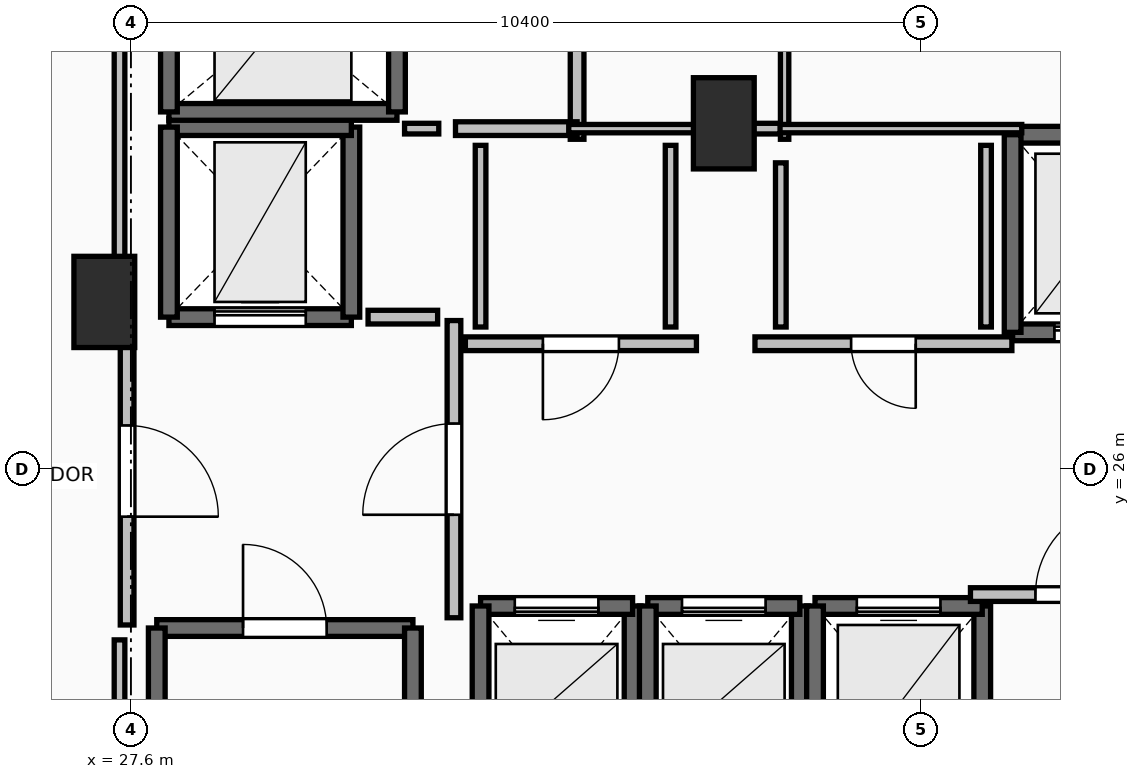
"""IFC4 building model, lengths in metres.
Left out: names, types, materials, properties, quantities, classifications, styles, units other than length and angle.
Written with IfcOpenShell. Run it as: python <this file> out.ifc"""

import sys

from ifc_helpers import new_model, si_unit, direction, frame, frame_2d, origin, origin_2d, place, context, subcontext, project, spatial, rectangle, extrude, element, fill, save


model = new_model("IFC4")
c1 = context("Model", 3, precision=1e-05, world=origin(), true_north=direction((0.0, 1.0)))
c2 = subcontext(c1, "Body", "Model", "MODEL_VIEW")
j1 = project(units=[si_unit("LENGTHUNIT", "METRE"), si_unit("PLANEANGLEUNIT", "RADIAN")], contexts=[c1])
p1 = place(None, origin())
s1 = spatial("IfcSite", under=j1, at=p1, CompositionType="ELEMENT")
p2 = place(p1, origin())
s2 = spatial("IfcBuilding", under=s1, at=p2, CompositionType="ELEMENT")
p3 = place(p2, frame((0.0, 0.0, 174.6)))
s3 = spatial("IfcBuildingStorey", under=s2, at=p3, CompositionType="ELEMENT", Elevation=174.6)
for number, where, z_axis, x_axis in (
    (1, (27.25, 28.2, 0.0), (0.0, 0.0, 1.0), (1.0, 0.0, 0.0)),
    (2, (35.4, 30.55, 0.0), (0.0, 0.0, 1.0), (1.0, 0.0, 0.0)),
):
    element("IfcColumn", number, at=place(p3, frame(where, z_axis=z_axis, x_axis=x_axis)), inside=s3, PredefinedType="PILASTER", context=c2, shape_type="SweptSolid", body=[
        extrude(rectangle(XDim=0.8, YDim=1.2, at=origin_2d()), origin(), (0.0, 0.0, 1.0), 4.5),
    ])
p4 = place(p3, frame((27.94, 23.91, 0.0), z_axis=(0.0, 0.0, 1.0), x_axis=(1.0, 0.0, 0.0)))
e3 = element("IfcWall", 3, at=p4, inside=s3, PredefinedType="SOLIDWALL", context=c2, shape_type="SweptSolid", body=[
    extrude(rectangle(XDim=3.37, YDim=0.22, at=frame_2d((1.685, 0.0))), origin(), (0.0, 0.0, 1.0), 4.24),
])
p5 = place(p4, frame((1.135, 0.0, 0.0)))
e4 = element("IfcOpeningElement", 4, at=p5, cuts=e3, PredefinedType="OPENING", context=c2, shape_type="SweptSolid", body=[
    extrude(rectangle(XDim=1.1, YDim=2.15, at=frame_2d((0.55, 1.075))), frame((0.0, 0.125, 0.0), z_axis=(0.0, -1.0, 0.0), x_axis=(1.0, 0.0, 0.0)), (0.0, 0.0, 1.0), 0.25),
])
for number, where, z_axis, x_axis in (
    (5, (31.31, 23.91, 0.0), (0.0, 0.0, 1.0), (0.0, -1.0, 0.0)),
    (6, (27.94, 16.49, 0.0), (0.0, 0.0, 1.0), (0.0, 1.0, 0.0)),
):
    element("IfcWall", number, at=place(p3, frame(where, z_axis=z_axis, x_axis=x_axis)), inside=s3, PredefinedType="SOLIDWALL", context=c2, shape_type="SweptSolid", body=[
        extrude(rectangle(XDim=7.42, YDim=0.22, at=frame_2d((3.71, 0.0))), origin(), (0.0, 0.0, 1.0), 4.24),
    ])
p6 = place(p3, frame((34.2, 21.8, 0.0), z_axis=(0.0, 0.0, 1.0), x_axis=(0.0, 1.0, 0.0)))
e7 = element("IfcWall", 7, at=p6, inside=s3, PredefinedType="SOLIDWALL", context=c2, shape_type="SweptSolid", body=[
    extrude(rectangle(XDim=2.4, YDim=0.22, at=frame_2d((1.2, 0.0))), origin(), (0.0, 0.0, 1.0), 4.24),
])
p7 = place(p3, frame((34.2, 24.2, 0.0), z_axis=(0.0, 0.0, 1.0), x_axis=(-1.0, 0.0, 0.0)))
e8 = element("IfcWall", 8, at=p7, inside=s3, PredefinedType="SOLIDWALL", context=c2, shape_type="SweptSolid", body=[
    extrude(rectangle(XDim=2.0, YDim=0.22, at=frame_2d((1.0, 0.0))), origin(), (0.0, 0.0, 1.0), 4.24),
])
p8 = place(p7, frame((0.45, 0.0, 0.0)))
e9 = element("IfcOpeningElement", 9, at=p8, cuts=e8, PredefinedType="OPENING", context=c2, shape_type="SweptSolid", body=[
    extrude(rectangle(XDim=1.1, YDim=2.2, at=frame_2d((0.55, 1.1))), frame((0.0, 0.125, 0.0), z_axis=(0.0, -1.0, 0.0), x_axis=(1.0, 0.0, 0.0)), (0.0, 0.0, 1.0), 0.25),
])
for number, where, z_axis, x_axis in (
    (10, (32.2, 24.2, 0.0), (0.0, 0.0, 1.0), (0.0, -1.0, 0.0)),
    (11, (36.4, 21.8, 0.0), (0.0, 0.0, 1.0), (0.0, 1.0, 0.0)),
):
    element("IfcWall", number, at=place(p3, frame(where, z_axis=z_axis, x_axis=x_axis)), inside=s3, PredefinedType="SOLIDWALL", context=c2, shape_type="SweptSolid", body=[
        extrude(rectangle(XDim=2.4, YDim=0.22, at=frame_2d((1.2, 0.0))), origin(), (0.0, 0.0, 1.0), 4.24),
    ])
p9 = place(p3, frame((36.4, 24.2, 0.0), z_axis=(0.0, 0.0, 1.0), x_axis=(-1.0, 0.0, 0.0)))
e12 = element("IfcWall", 12, at=p9, inside=s3, PredefinedType="SOLIDWALL", context=c2, shape_type="SweptSolid", body=[
    extrude(rectangle(XDim=2.0, YDim=0.22, at=frame_2d((1.0, 0.0))), origin(), (0.0, 0.0, 1.0), 4.24),
])
p10 = place(p9, frame((0.45, 0.0, 0.0)))
e13 = element("IfcOpeningElement", 13, at=p10, cuts=e12, PredefinedType="OPENING", context=c2, shape_type="SweptSolid", body=[
    extrude(rectangle(XDim=1.1, YDim=2.2, at=frame_2d((0.55, 1.1))), frame((0.0, 0.125, 0.0), z_axis=(0.0, -1.0, 0.0), x_axis=(1.0, 0.0, 0.0)), (0.0, 0.0, 1.0), 0.25),
])
p11 = place(p3, frame((34.4, 24.2, 0.0), z_axis=(0.0, 0.0, 1.0), x_axis=(0.0, -1.0, 0.0)))
e14 = element("IfcWall", 14, at=p11, inside=s3, PredefinedType="SOLIDWALL", context=c2, shape_type="SweptSolid", body=[
    extrude(rectangle(XDim=2.4, YDim=0.22, at=frame_2d((1.2, 0.0))), origin(), (0.0, 0.0, 1.0), 4.24),
])
p12 = place(p3, frame((38.8, 21.6, 0.0), z_axis=(0.0, 0.0, 1.0), x_axis=(0.0, 1.0, 0.0)))
e15 = element("IfcWall", 15, at=p12, inside=s3, PredefinedType="SOLIDWALL", context=c2, shape_type="SweptSolid", body=[
    extrude(rectangle(XDim=2.6, YDim=0.22, at=frame_2d((1.3, 0.0))), origin(), (0.0, 0.0, 1.0), 4.24),
])
p13 = place(p3, frame((38.8, 24.2, 0.0), z_axis=(0.0, 0.0, 1.0), x_axis=(-1.0, 0.0, 0.0)))
e16 = element("IfcWall", 16, at=p13, inside=s3, PredefinedType="SOLIDWALL", context=c2, shape_type="SweptSolid", body=[
    extrude(rectangle(XDim=2.2, YDim=0.22, at=frame_2d((1.1, 0.0))), origin(), (0.0, 0.0, 1.0), 4.24),
])
p14 = place(p13, frame((0.55, 0.0, 0.0)))
e17 = element("IfcOpeningElement", 17, at=p14, cuts=e16, PredefinedType="OPENING", context=c2, shape_type="SweptSolid", body=[
    extrude(rectangle(XDim=1.1, YDim=2.2, at=frame_2d((0.55, 1.1))), frame((0.0, 0.125, 0.0), z_axis=(0.0, -1.0, 0.0), x_axis=(1.0, 0.0, 0.0)), (0.0, 0.0, 1.0), 0.25),
])
p15 = place(p3, frame((36.6, 24.2, 0.0), z_axis=(0.0, 0.0, 1.0), x_axis=(0.0, -1.0, 0.0)))
e18 = element("IfcWall", 18, at=p15, inside=s3, PredefinedType="SOLIDWALL", context=c2, shape_type="SweptSolid", body=[
    extrude(rectangle(XDim=2.6, YDim=0.22, at=frame_2d((1.3, 0.0))), origin(), (0.0, 0.0, 1.0), 4.24),
])
p16 = place(p3, frame((39.2, 27.8, 0.0), z_axis=(0.0, 0.0, 1.0), x_axis=(1.0, 0.0, 0.0)))
e19 = element("IfcWall", 19, at=p16, inside=s3, PredefinedType="SOLIDWALL", context=c2, shape_type="SweptSolid", body=[
    extrude(rectangle(XDim=2.2, YDim=0.22, at=frame_2d((1.1, 0.0))), origin(), (0.0, 0.0, 1.0), 4.24),
])
p17 = place(p16, frame((0.55, 0.0, 0.0)))
e20 = element("IfcOpeningElement", 20, at=p17, cuts=e19, PredefinedType="OPENING", context=c2, shape_type="SweptSolid", body=[
    extrude(rectangle(XDim=1.1, YDim=2.2, at=frame_2d((0.55, 1.1))), frame((0.0, 0.125, 0.0), z_axis=(0.0, -1.0, 0.0), x_axis=(1.0, 0.0, 0.0)), (0.0, 0.0, 1.0), 0.25),
])
p18 = place(p3, frame((41.4, 30.4, 0.0), z_axis=(0.0, 0.0, 1.0), x_axis=(-1.0, 0.0, 0.0)))
e21 = element("IfcWall", 21, at=p18, inside=s3, PredefinedType="SOLIDWALL", context=c2, shape_type="SweptSolid", body=[
    extrude(rectangle(XDim=2.2, YDim=0.22, at=frame_2d((1.1, 0.0))), origin(), (0.0, 0.0, 1.0), 4.24),
])
p19 = place(p3, frame((39.2, 30.4, 0.0), z_axis=(0.0, 0.0, 1.0), x_axis=(0.0, -1.0, 0.0)))
e22 = element("IfcWall", 22, at=p19, inside=s3, PredefinedType="SOLIDWALL", context=c2, shape_type="SweptSolid", body=[
    extrude(rectangle(XDim=2.6, YDim=0.22, at=frame_2d((1.3, 0.0))), origin(), (0.0, 0.0, 1.0), 4.24),
])
p20 = place(p3, frame((28.1, 28.0, 0.0), z_axis=(0.0, 0.0, 1.0), x_axis=(1.0, 0.0, 0.0)))
e23 = element("IfcWall", 23, at=p20, inside=s3, PredefinedType="SHEAR", context=c2, shape_type="SweptSolid", body=[
    extrude(rectangle(XDim=2.4, YDim=0.22, at=frame_2d((1.2, 0.0))), origin(), (0.0, 0.0, 1.0), 4.24),
])
p21 = place(p20, frame((0.6, 0.0, 0.0)))
e24 = element("IfcOpeningElement", 24, at=p21, cuts=e23, PredefinedType="OPENING", context=c2, shape_type="SweptSolid", body=[
    extrude(rectangle(XDim=1.2, YDim=2.2, at=frame_2d((0.6, 1.1))), frame((0.0, 0.125, 0.0), z_axis=(0.0, -1.0, 0.0), x_axis=(1.0, 0.0, 0.0)), (0.0, 0.0, 1.0), 0.25),
])
p22 = place(p3, frame((30.5, 28.0, 0.0), z_axis=(0.0, 0.0, 1.0), x_axis=(0.0, 1.0, 0.0)))
e25 = element("IfcWall", 25, at=p22, inside=s3, PredefinedType="SHEAR", context=c2, shape_type="SweptSolid", body=[
    extrude(rectangle(XDim=2.5, YDim=0.22, at=frame_2d((1.25, 0.0))), origin(), (0.0, 0.0, 1.0), 4.24),
])
p23 = place(p3, frame((30.5, 30.5, 0.0), z_axis=(0.0, 0.0, 1.0), x_axis=(-1.0, 0.0, 0.0)))
e26 = element("IfcWall", 26, at=p23, inside=s3, PredefinedType="SHEAR", context=c2, shape_type="SweptSolid", body=[
    extrude(rectangle(XDim=2.4, YDim=0.22, at=frame_2d((1.2, 0.0))), origin(), (0.0, 0.0, 1.0), 4.24),
])
p24 = place(p3, frame((28.1, 30.5, 0.0), z_axis=(0.0, 0.0, 1.0), x_axis=(0.0, -1.0, 0.0)))
e27 = element("IfcWall", 27, at=p24, inside=s3, PredefinedType="SHEAR", context=c2, shape_type="SweptSolid", body=[
    extrude(rectangle(XDim=2.5, YDim=0.22, at=frame_2d((1.25, 0.0))), origin(), (0.0, 0.0, 1.0), 4.24),
])
p25 = place(p3, frame((28.1, 30.7, 0.0), z_axis=(0.0, 0.0, 1.0), x_axis=(1.0, 0.0, 0.0)))
e28 = element("IfcWall", 28, at=p25, inside=s3, PredefinedType="SOLIDWALL", context=c2, shape_type="SweptSolid", body=[
    extrude(rectangle(XDim=3.0, YDim=0.22, at=frame_2d((1.5, 0.0))), origin(), (0.0, 0.0, 1.0), 4.24),
])
for number, where, z_axis, x_axis in (
    (29, (31.1, 30.7, 0.0), (0.0, 0.0, 1.0), (0.0, 1.0, 0.0)),
    (30, (28.1, 33.2, 0.0), (0.0, 0.0, 1.0), (0.0, -1.0, 0.0)),
):
    element("IfcWall", number, at=place(p3, frame(where, z_axis=z_axis, x_axis=x_axis)), inside=s3, PredefinedType="SOLIDWALL", context=c2, shape_type="SweptSolid", body=[
        extrude(rectangle(XDim=2.5, YDim=0.22, at=frame_2d((1.25, 0.0))), origin(), (0.0, 0.0, 1.0), 4.24),
    ])
p26 = place(p3, frame((31.85, 24.045, 0.0), z_axis=(0.0, 0.0, 1.0), x_axis=(0.0, 1.0, 0.0)))
e31 = element("IfcWall", 31, at=p26, inside=s3, PredefinedType="PARTITIONING", context=c2, shape_type="SweptSolid", body=[
    extrude(rectangle(XDim=3.91, YDim=0.18, at=frame_2d((1.955, 0.0))), origin(), (0.0, 0.0, 1.0), 4.24),
])
p27 = place(p26, frame((1.355, 0.0, 0.0)))
e32 = element("IfcOpeningElement", 32, at=p27, cuts=e31, PredefinedType="OPENING", context=c2, shape_type="SweptSolid", body=[
    extrude(rectangle(XDim=1.2, YDim=2.15, at=frame_2d((0.6, 1.075))), frame((0.0, 0.105, 0.0), z_axis=(0.0, -1.0, 0.0), x_axis=(1.0, 0.0, 0.0)), (0.0, 0.0, 1.0), 0.21),
])
p28 = place(p3, frame((27.55, 28.0, 0.0), z_axis=(0.0, 0.0, 1.0), x_axis=(0.0, -1.0, 0.0)))
e33 = element("IfcWall", 33, at=p28, inside=s3, PredefinedType="PARTITIONING", context=c2, shape_type="SweptSolid", body=[
    extrude(rectangle(XDim=4.05, YDim=0.18, at=frame_2d((2.025, 0.0))), origin(), (0.0, 0.0, 1.0), 4.24),
])
p29 = place(p28, frame((1.425, 0.0, 0.0)))
e34 = element("IfcOpeningElement", 34, at=p29, cuts=e33, PredefinedType="OPENING", context=c2, shape_type="SweptSolid", body=[
    extrude(rectangle(XDim=1.2, YDim=2.15, at=frame_2d((0.6, 1.075))), frame((0.0, 0.105, 0.0), z_axis=(0.0, -1.0, 0.0), x_axis=(1.0, 0.0, 0.0)), (0.0, 0.0, 1.0), 0.21),
])
p30 = place(p3, frame((33.47, 30.34, 0.0), z_axis=(0.0, 0.0, 1.0), x_axis=(0.0, 1.0, 0.0)))
e35 = element("IfcWall", 35, at=p30, inside=s3, PredefinedType="PARTITIONING", context=c2, shape_type="SweptSolid", body=[
    extrude(rectangle(XDim=3.56, YDim=0.18, at=frame_2d((1.78, 0.0))), origin(), (0.0, 0.0, 1.0), 4.24),
])
p31 = place(p3, frame((31.87, 30.48, 0.0), z_axis=(0.0, 0.0, 1.0), x_axis=(1.0, 0.0, 0.0)))
e36 = element("IfcWall", 36, at=p31, inside=s3, PredefinedType="PARTITIONING", context=c2, shape_type="SweptSolid", body=[
    extrude(rectangle(XDim=1.6, YDim=0.18, at=frame_2d((0.8, 0.0))), origin(), (0.0, 0.0, 1.0), 4.24),
])
p32 = place(p3, frame((38.645, 24.35, 0.0), z_axis=(0.0, 0.0, 1.0), x_axis=(1.0, 0.0, 0.0)))
e37 = element("IfcWall", 37, at=p32, inside=s3, PredefinedType="PARTITIONING", context=c2, shape_type="SweptSolid", body=[
    extrude(rectangle(XDim=2.91, YDim=0.18, at=frame_2d((1.455, 0.0))), origin(), (0.0, 0.0, 1.0), 4.24),
])
p33 = place(p32, frame((0.855, 0.0, 0.0)))
e38 = element("IfcOpeningElement", 38, at=p33, cuts=e37, PredefinedType="OPENING", context=c2, shape_type="SweptSolid", body=[
    extrude(rectangle(XDim=1.2, YDim=2.15, at=frame_2d((0.6, 1.075))), frame((0.0, 0.105, 0.0), z_axis=(0.0, -1.0, 0.0), x_axis=(1.0, 0.0, 0.0)), (0.0, 0.0, 1.0), 0.21),
])
p34 = place(p3, frame((35.04, 27.65, 0.0), z_axis=(0.0, 0.0, 1.0), x_axis=(-1.0, 0.0, 0.0)))
e39 = element("IfcWall", 39, at=p34, inside=s3, PredefinedType="PARTITIONING", context=c2, shape_type="SweptSolid", body=[
    extrude(rectangle(XDim=3.04, YDim=0.18, at=frame_2d((1.52, 0.0))), origin(), (0.0, 0.0, 1.0), 4.24),
])
p35 = place(p34, frame((1.02, 0.0, 0.0)))
e40 = element("IfcOpeningElement", 40, at=p35, cuts=e39, PredefinedType="OPENING", context=c2, shape_type="SweptSolid", body=[
    extrude(rectangle(XDim=1.0, YDim=2.15, at=frame_2d((0.5, 1.075))), frame((0.0, 0.105, 0.0), z_axis=(0.0, -1.0, 0.0), x_axis=(1.0, 0.0, 0.0)), (0.0, 0.0, 1.0), 0.21),
])
p36 = place(p3, frame((39.19, 27.65, 0.0), z_axis=(0.0, 0.0, 1.0), x_axis=(-1.0, 0.0, 0.0)))
e41 = element("IfcWall", 41, at=p36, inside=s3, PredefinedType="PARTITIONING", context=c2, shape_type="SweptSolid", body=[
    extrude(rectangle(XDim=3.38, YDim=0.18, at=frame_2d((1.69, 0.0))), origin(), (0.0, 0.0, 1.0), 4.24),
])
p37 = place(p36, frame((1.265, 0.0, 0.0)))
e42 = element("IfcOpeningElement", 42, at=p37, cuts=e41, PredefinedType="OPENING", context=c2, shape_type="SweptSolid", body=[
    extrude(rectangle(XDim=0.85, YDim=2.1, at=frame_2d((0.425, 1.05))), frame((0.0, 0.105, 0.0), z_axis=(0.0, -1.0, 0.0), x_axis=(1.0, 0.0, 0.0)), (0.0, 0.0, 1.0), 0.21),
])
p38 = place(p3, frame((36.2, 30.34, 0.0), z_axis=(0.0, 0.0, 1.0), x_axis=(0.0, 1.0, 0.0)))
e43 = element("IfcWall", 43, at=p38, inside=s3, PredefinedType="PARTITIONING", context=c2, shape_type="SweptSolid", body=[
    extrude(rectangle(XDim=3.56, YDim=0.11, at=frame_2d((1.78, 0.0))), origin(), (0.0, 0.0, 1.0), 3.432),
])
p39 = place(p3, frame((33.36, 30.48, 0.0), z_axis=(0.0, 0.0, 1.0), x_axis=(1.0, 0.0, 0.0)))
e44 = element("IfcWall", 44, at=p39, inside=s3, PredefinedType="PARTITIONING", context=c2, shape_type="SweptSolid", body=[
    extrude(rectangle(XDim=1.81, YDim=0.11, at=frame_2d((0.905, 0.0))), origin(), (0.0, 0.0, 1.0), 4.24),
])
p40 = place(p3, frame((36.11, 30.48, 0.0), z_axis=(0.0, 0.0, 1.0), x_axis=(1.0, 0.0, 0.0)))
e45 = element("IfcWall", 45, at=p40, inside=s3, PredefinedType="PARTITIONING", context=c2, shape_type="SweptSolid", body=[
    extrude(rectangle(XDim=3.21, YDim=0.11, at=frame_2d((1.605, 0.0))), origin(), (0.0, 0.0, 1.0), 3.432),
])
p41 = place(p3, frame((31.635, 28.0, 0.0), z_axis=(0.0, 0.0, 1.0), x_axis=(-1.0, 0.0, 0.0)))
e46 = element("IfcWall", 46, at=p41, inside=s3, PredefinedType="PARTITIONING", context=c2, shape_type="SweptSolid", body=[
    extrude(rectangle(XDim=0.915, YDim=0.18, at=frame_2d((0.458, 0.0))), origin(), (0.0, 0.0, 1.0), 4.24),
])
p42 = place(p3, frame((31.2, 30.48, 0.0), z_axis=(0.0, 0.0, 1.0), x_axis=(1.0, 0.0, 0.0)))
e47 = element("IfcWall", 47, at=p42, inside=s3, PredefinedType="PARTITIONING", context=c2, shape_type="SweptSolid", body=[
    extrude(rectangle(XDim=0.45, YDim=0.14, at=frame_2d((0.225, 0.0))), origin(), (0.0, 0.0, 1.0), 4.24),
])
p43 = place(p3, frame((35.14, 30.48, 0.0), z_axis=(0.0, 0.0, 1.0), x_axis=(1.0, 0.0, 0.0)))
e48 = element("IfcWall", 48, at=p43, inside=s3, PredefinedType="PARTITIONING", context=c2, shape_type="SweptSolid", body=[
    extrude(rectangle(XDim=1.0, YDim=0.14, at=frame_2d((0.5, 0.0))), origin(), (0.0, 0.0, 1.0), 3.432),
])
for number, where, z_axis, x_axis in (
    (49, (32.2, 30.26, 0.0), (0.0, 0.0, 1.0), (0.0, -1.0, 0.0)),
    (50, (34.7, 27.87, 0.0), (0.0, 0.0, 1.0), (0.0, 1.0, 0.0)),
):
    element("IfcWall", number, at=place(p3, frame(where, z_axis=z_axis, x_axis=x_axis)), inside=s3, PredefinedType="PARTITIONING", context=c2, shape_type="SweptSolid", body=[
        extrude(rectangle(XDim=2.39, YDim=0.14, at=frame_2d((1.195, 0.0))), origin(), (0.0, 0.0, 1.0), 4.24),
    ])
p44 = place(p3, frame((36.15, 30.03, 0.0), z_axis=(0.0, 0.0, 1.0), x_axis=(0.0, -1.0, 0.0)))
e51 = element("IfcWall", 51, at=p44, inside=s3, PredefinedType="PARTITIONING", context=c2, shape_type="SweptSolid", body=[
    extrude(rectangle(XDim=2.16, YDim=0.14, at=frame_2d((1.08, 0.0))), origin(), (0.0, 0.0, 1.0), 4.24),
])
p45 = place(p3, frame((38.85, 27.87, 0.0), z_axis=(0.0, 0.0, 1.0), x_axis=(0.0, 1.0, 0.0)))
e52 = element("IfcWall", 52, at=p45, inside=s3, PredefinedType="PARTITIONING", context=c2, shape_type="SweptSolid", body=[
    extrude(rectangle(XDim=2.39, YDim=0.14, at=frame_2d((1.195, 0.0))), origin(), (0.0, 0.0, 1.0), 4.24),
])
p46 = place(p3, frame((27.45, 33.45, 0.0), z_axis=(0.0, 0.0, 1.0), x_axis=(0.0, -1.0, 0.0)))
e53 = element("IfcWall", 53, at=p46, inside=s3, PredefinedType="PARTITIONING", context=c2, shape_type="SweptSolid", body=[
    extrude(rectangle(XDim=5.254, YDim=0.14, at=frame_2d((2.627, 0.0))), origin(), (0.0, 0.0, 1.0), 3.432),
])
p47 = place(p3, frame((27.45, 23.754, 0.0), z_axis=(0.0, 0.0, 1.0), x_axis=(0.0, -1.0, 0.0)))
e54 = element("IfcWall", 54, at=p47, inside=s3, PredefinedType="PARTITIONING", context=c2, shape_type="SweptSolid", body=[
    extrude(rectangle(XDim=7.514, YDim=0.14, at=frame_2d((3.757, 0.0))), origin(), (0.0, 0.0, 1.0), 3.432),
])
p48 = place(p5, origin())
e55 = element("IfcDoor", 55, at=p48, inside=s3, OperationType="SINGLE_SWING_LEFT", PredefinedType="DOOR", context=c2, shape_type="SweptSolid", body=[
    extrude(rectangle(XDim=1.1, YDim=2.15, at=frame_2d((0.55, 1.075))), frame((0.0, 0.025, 0.0), z_axis=(0.0, -1.0, 0.0), x_axis=(1.0, 0.0, 0.0)), (0.0, 0.0, 1.0), 0.05),
])
fill(e4, e55)
p49 = place(p8, origin())
e56 = element("IfcDoor", 56, at=p49, inside=s3, OperationType="SLIDING_TO_LEFT", PredefinedType="DOOR", context=c2, shape_type="SweptSolid", body=[
    extrude(rectangle(XDim=1.1, YDim=2.2, at=frame_2d((0.55, 1.1))), frame((0.0, 0.025, 0.0), z_axis=(0.0, -1.0, 0.0), x_axis=(1.0, 0.0, 0.0)), (0.0, 0.0, 1.0), 0.05),
])
fill(e9, e56)
p50 = place(p10, origin())
e57 = element("IfcDoor", 57, at=p50, inside=s3, OperationType="SLIDING_TO_LEFT", PredefinedType="DOOR", context=c2, shape_type="SweptSolid", body=[
    extrude(rectangle(XDim=1.1, YDim=2.2, at=frame_2d((0.55, 1.1))), frame((0.0, 0.025, 0.0), z_axis=(0.0, -1.0, 0.0), x_axis=(1.0, 0.0, 0.0)), (0.0, 0.0, 1.0), 0.05),
])
fill(e13, e57)
p51 = place(p14, origin())
e58 = element("IfcDoor", 58, at=p51, inside=s3, OperationType="SLIDING_TO_LEFT", PredefinedType="DOOR", context=c2, shape_type="SweptSolid", body=[
    extrude(rectangle(XDim=1.1, YDim=2.2, at=frame_2d((0.55, 1.1))), frame((0.0, 0.025, 0.0), z_axis=(0.0, -1.0, 0.0), x_axis=(1.0, 0.0, 0.0)), (0.0, 0.0, 1.0), 0.05),
])
fill(e17, e58)
p52 = place(p17, origin())
e59 = element("IfcDoor", 59, at=p52, inside=s3, OperationType="SLIDING_TO_LEFT", PredefinedType="DOOR", context=c2, shape_type="SweptSolid", body=[
    extrude(rectangle(XDim=1.1, YDim=2.2, at=frame_2d((0.55, 1.1))), frame((0.0, 0.025, 0.0), z_axis=(0.0, -1.0, 0.0), x_axis=(1.0, 0.0, 0.0)), (0.0, 0.0, 1.0), 0.05),
])
fill(e20, e59)
p53 = place(p21, origin())
e60 = element("IfcDoor", 60, at=p53, inside=s3, OperationType="SLIDING_TO_LEFT", PredefinedType="DOOR", context=c2, shape_type="SweptSolid", body=[
    extrude(rectangle(XDim=1.2, YDim=2.2, at=frame_2d((0.6, 1.1))), frame((0.0, 0.025, 0.0), z_axis=(0.0, -1.0, 0.0), x_axis=(1.0, 0.0, 0.0)), (0.0, 0.0, 1.0), 0.05),
])
fill(e24, e60)
p54 = place(p27, origin())
e61 = element("IfcDoor", 61, at=p54, inside=s3, OperationType="SINGLE_SWING_LEFT", PredefinedType="DOOR", context=c2, shape_type="SweptSolid", body=[
    extrude(rectangle(XDim=1.2, YDim=2.15, at=frame_2d((0.6, 1.075))), frame((0.0, 0.025, 0.0), z_axis=(0.0, -1.0, 0.0), x_axis=(1.0, 0.0, 0.0)), (0.0, 0.0, 1.0), 0.05),
])
fill(e32, e61)
p55 = place(p29, origin())
e62 = element("IfcDoor", 62, at=p55, inside=s3, OperationType="SINGLE_SWING_RIGHT", PredefinedType="DOOR", context=c2, shape_type="SweptSolid", body=[
    extrude(rectangle(XDim=1.2, YDim=2.15, at=frame_2d((0.6, 1.075))), frame((0.0, 0.025, 0.0), z_axis=(0.0, -1.0, 0.0), x_axis=(1.0, 0.0, 0.0)), (0.0, 0.0, 1.0), 0.05),
])
fill(e34, e62)
p56 = place(p33, origin())
e63 = element("IfcDoor", 63, at=p56, inside=s3, OperationType="SINGLE_SWING_RIGHT", PredefinedType="DOOR", context=c2, shape_type="SweptSolid", body=[
    extrude(rectangle(XDim=1.2, YDim=2.15, at=frame_2d((0.6, 1.075))), frame((0.0, 0.025, 0.0), z_axis=(0.0, -1.0, 0.0), x_axis=(1.0, 0.0, 0.0)), (0.0, 0.0, 1.0), 0.05),
])
fill(e38, e63)
p57 = place(p35, origin())
e64 = element("IfcDoor", 64, at=p57, inside=s3, OperationType="SINGLE_SWING_RIGHT", PredefinedType="DOOR", context=c2, shape_type="SweptSolid", body=[
    extrude(rectangle(XDim=1.0, YDim=2.15, at=frame_2d((0.5, 1.075))), frame((0.0, 0.025, 0.0), z_axis=(0.0, -1.0, 0.0), x_axis=(1.0, 0.0, 0.0)), (0.0, 0.0, 1.0), 0.05),
])
fill(e40, e64)
p58 = place(p37, origin())
e65 = element("IfcDoor", 65, at=p58, inside=s3, OperationType="SINGLE_SWING_LEFT", PredefinedType="DOOR", context=c2, shape_type="SweptSolid", body=[
    extrude(rectangle(XDim=0.85, YDim=2.1, at=frame_2d((0.425, 1.05))), frame((0.0, 0.025, 0.0), z_axis=(0.0, -1.0, 0.0), x_axis=(1.0, 0.0, 0.0)), (0.0, 0.0, 1.0), 0.05),
])
fill(e42, e65)
save(model, sys.argv[1])
